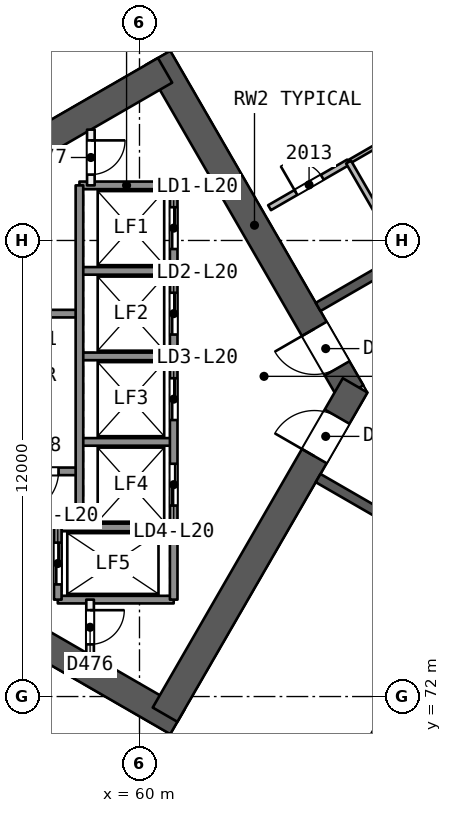
"""IFC4 building model, lengths in metres.
Left out: names, types, materials, properties, quantities, classifications, styles, units other than length and angle.
Written with IfcOpenShell. Run it as: python <this file> out.ifc"""

import sys

from ifc_helpers import new_model, si_unit, direction, frame, frame_2d, origin, place, context, subcontext, project, spatial, rectangle, extrude, element, fill, save


model = new_model("IFC4")
c1 = context("Model", 3, precision=1e-05, world=origin(), true_north=direction((0.0, 1.0)))
c2 = subcontext(c1, "Body", "Model", "MODEL_VIEW")
j1 = project(units=[si_unit("LENGTHUNIT", "METRE"), si_unit("PLANEANGLEUNIT", "RADIAN")], contexts=[c1])
p1 = place(None, origin())
s1 = spatial("IfcSite", under=j1, at=p1, CompositionType="ELEMENT")
p2 = place(p1, origin())
s2 = spatial("IfcBuilding", under=s1, at=p2, CompositionType="ELEMENT")
p3 = place(p2, frame((0.0, 0.0, 86.9)))
s3 = spatial("IfcBuildingStorey", under=s2, at=p3, CompositionType="ELEMENT", Elevation=86.9)
p4 = place(p3, frame((65.567, 80.0, 0.0), z_axis=(0.0, 0.0, 1.0), x_axis=(-0.499988615364, 0.866031976607, 0.0)))
e1 = element("IfcWall", 1, at=p4, inside=s3, PredefinedType="SHEAR", context=c2, shape_type="SweptSolid", body=[
    extrude(rectangle(XDim=10.163, YDim=0.75, at=frame_2d((5.082, 0.0))), origin(), (0.0, 0.0, 1.0), 3.7),
])
p5 = place(p4, frame((0.733, 0.0, 0.0)))
e2 = element("IfcOpeningElement", 2, at=p5, cuts=e1, PredefinedType="OPENING", context=c2, shape_type="SweptSolid", body=[
    extrude(rectangle(XDim=1.2, YDim=2.1, at=frame_2d((0.6, 1.05))), frame((0.0, 0.385, 0.0), z_axis=(0.0, -1.0, 0.0), x_axis=(1.0, 0.0, 0.0)), (0.0, 0.0, 1.0), 0.771),
])
p6 = place(p3, frame((60.673, 88.477, 0.0), z_axis=(0.0, 0.0, 1.0), x_axis=(-0.8660248072, -0.500001033313, 0.0)))
e3 = element("IfcWall", 3, at=p6, inside=s3, PredefinedType="SHEAR", context=c2, shape_type="SweptSolid", body=[
    extrude(rectangle(XDim=13.958, YDim=0.75, at=frame_2d((6.979, 0.0))), origin(), (0.0, 0.0, 1.0), 3.7),
])
p7 = place(p3, frame((48.772, 78.394, 0.0), z_axis=(0.0, 0.0, 1.0), x_axis=(0.866028339916, -0.499994914436, 0.0)))
e4 = element("IfcWall", 4, at=p7, inside=s3, PredefinedType="SHEAR", context=c2, shape_type="SweptSolid", body=[
    extrude(rectangle(XDim=14.117, YDim=0.75, at=frame_2d((7.059, 0.0))), origin(), (0.0, 0.0, 1.0), 3.7),
])
p8 = place(p3, frame((60.673, 71.523, 0.0), z_axis=(0.0, 0.0, 1.0), x_axis=(0.499997052475, 0.866027105532, 0.0)))
e5 = element("IfcWall", 5, at=p8, inside=s3, PredefinedType="SHEAR", context=c2, shape_type="SweptSolid", body=[
    extrude(rectangle(XDim=10.005, YDim=0.75, at=frame_2d((5.002, 0.0))), origin(), (0.0, 0.0, 1.0), 3.7),
])
p9 = place(p8, frame((7.855, 0.0, 0.0)))
e6 = element("IfcOpeningElement", 6, at=p9, cuts=e5, PredefinedType="OPENING", context=c2, shape_type="SweptSolid", body=[
    extrude(rectangle(XDim=1.2, YDim=2.1, at=frame_2d((0.6, 1.05))), frame((0.0, 0.385, 0.0), z_axis=(0.0, -1.0, 0.0), x_axis=(1.0, 0.0, 0.0)), (0.0, 0.0, 1.0), 0.771),
])
p10 = place(p3, frame((78.2, 90.046, 0.0), z_axis=(0.0, 0.0, 1.0), x_axis=(-0.866026492143, -0.499998114903, 0.0)))
e7 = element("IfcWall", 7, at=p10, inside=s3, PredefinedType="SHEAR", context=c2, shape_type="SweptSolid", body=[
    extrude(rectangle(XDim=15.588, YDim=0.25, at=frame_2d((7.794, 0.0))), origin(), (0.0, 0.0, 1.0), 3.2),
])
p11 = place(p10, frame((4.718, 0.0, 0.0)))
e8 = element("IfcOpeningElement", 8, at=p11, cuts=e7, PredefinedType="OPENING", context=c2, shape_type="SweptSolid", body=[
    extrude(rectangle(XDim=1.0, YDim=2.1, at=frame_2d((0.5, 1.05))), frame((0.0, 0.135, 0.0), z_axis=(0.0, -1.0, 0.0), x_axis=(1.0, 0.0, 0.0)), (0.0, 0.0, 1.0), 0.271),
])
p12 = place(p10, frame((7.194, 0.0, 0.0)))
e9 = element("IfcOpeningElement", 9, at=p12, cuts=e7, PredefinedType="OPENING", context=c2, shape_type="SweptSolid", body=[
    extrude(rectangle(XDim=1.2, YDim=2.4, at=frame_2d((0.6, 1.2))), frame((0.0, 0.135, 0.0), z_axis=(0.0, -1.0, 0.0), x_axis=(1.0, 0.0, 0.0)), (0.0, 0.0, 1.0), 0.271),
])
p13 = place(p10, frame((9.871, 0.0, 0.0)))
e10 = element("IfcOpeningElement", 10, at=p13, cuts=e7, PredefinedType="OPENING", context=c2, shape_type="SweptSolid", body=[
    extrude(rectangle(XDim=1.0, YDim=2.1, at=frame_2d((0.5, 1.05))), frame((0.0, 0.135, 0.0), z_axis=(0.0, -1.0, 0.0), x_axis=(1.0, 0.0, 0.0)), (0.0, 0.0, 1.0), 0.271),
])
p14 = place(p3, frame((64.7, 77.748, 0.0), z_axis=(0.0, 0.0, 1.0), x_axis=(0.866026492143, -0.499998114903, 0.0)))
e11 = element("IfcWall", 11, at=p14, inside=s3, PredefinedType="SHEAR", context=c2, shape_type="SweptSolid", body=[
    extrude(rectangle(XDim=15.588, YDim=0.25, at=frame_2d((7.794, 0.0))), origin(), (0.0, 0.0, 1.0), 3.2),
])
p15 = place(p14, frame((1.738, 0.0, 0.0)))
e12 = element("IfcOpeningElement", 12, at=p15, cuts=e11, PredefinedType="OPENING", context=c2, shape_type="SweptSolid", body=[
    extrude(rectangle(XDim=1.2, YDim=2.4, at=frame_2d((0.6, 1.2))), frame((0.0, 0.135, 0.0), z_axis=(0.0, -1.0, 0.0), x_axis=(1.0, 0.0, 0.0)), (0.0, 0.0, 1.0), 0.271),
])
p16 = place(p14, frame((5.785, 0.0, 0.0)))
e13 = element("IfcOpeningElement", 13, at=p16, cuts=e11, PredefinedType="OPENING", context=c2, shape_type="SweptSolid", body=[
    extrude(rectangle(XDim=0.9, YDim=2.1, at=frame_2d((0.45, 1.05))), frame((0.0, 0.135, 0.0), z_axis=(0.0, -1.0, 0.0), x_axis=(1.0, 0.0, 0.0)), (0.0, 0.0, 1.0), 0.271),
])
p17 = place(p14, frame((8.903, 0.0, 0.0)))
e14 = element("IfcOpeningElement", 14, at=p17, cuts=e11, PredefinedType="OPENING", context=c2, shape_type="SweptSolid", body=[
    extrude(rectangle(XDim=0.9, YDim=2.1, at=frame_2d((0.45, 1.05))), frame((0.0, 0.135, 0.0), z_axis=(0.0, -1.0, 0.0), x_axis=(1.0, 0.0, 0.0)), (0.0, 0.0, 1.0), 0.271),
])
p18 = place(p14, frame((12.75, 0.0, 0.0)))
e15 = element("IfcOpeningElement", 15, at=p18, cuts=e11, PredefinedType="OPENING", context=c2, shape_type="SweptSolid", body=[
    extrude(rectangle(XDim=1.0, YDim=2.1, at=frame_2d((0.5, 1.05))), frame((0.0, 0.135, 0.0), z_axis=(0.0, -1.0, 0.0), x_axis=(1.0, 0.0, 0.0)), (0.0, 0.0, 1.0), 0.271),
])
p19 = place(p3, frame((63.549, 96.716, 0.0), z_axis=(0.0, 0.0, 1.0), x_axis=(0.50000686924, -0.866021437791, 0.0)))
e16 = element("IfcWall", 16, at=p19, inside=s3, PredefinedType="PARTITIONING", context=c2, shape_type="SweptSolid", body=[
    extrude(rectangle(XDim=13.102, YDim=0.2, at=frame_2d((6.551, 0.0))), origin(), (0.0, 0.0, 1.0), 3.2),
])
p20 = place(p3, frame((63.422, 84.863, 0.0), z_axis=(0.0, 0.0, 1.0), x_axis=(0.865994240961, 0.500053971709, 0.0)))
e17 = element("IfcWall", 17, at=p20, inside=s3, PredefinedType="PARTITIONING", context=c2, shape_type="SweptSolid", body=[
    extrude(rectangle(XDim=2.401, YDim=0.15, at=frame_2d((1.201, 0.0))), origin(), (0.0, 0.0, 1.0), 3.2),
])
p21 = place(p20, frame((0.801, 0.0, 0.0)))
e18 = element("IfcOpeningElement", 18, at=p21, cuts=e17, PredefinedType="OPENING", context=c2, shape_type="SweptSolid", body=[
    extrude(rectangle(XDim=0.8, YDim=2.1, at=frame_2d((0.4, 1.05))), frame((0.0, 0.085, 0.0), z_axis=(0.0, -1.0, 0.0), x_axis=(1.0, 0.0, 0.0)), (0.0, 0.0, 1.0), 0.171),
])
p22 = place(p3, frame((65.502, 86.063, 0.0), z_axis=(0.0, 0.0, 1.0), x_axis=(0.866055983265, 0.499947031044, 0.0)))
e19 = element("IfcWall", 19, at=p22, inside=s3, PredefinedType="PARTITIONING", context=c2, shape_type="SweptSolid", body=[
    extrude(rectangle(XDim=1.6, YDim=0.1, at=frame_2d((0.8, 0.0))), origin(), (0.0, 0.0, 1.0), 3.2),
])
p23 = place(p3, frame((66.952, 83.552, 0.0), z_axis=(0.0, 0.0, 1.0), x_axis=(-0.499987231761, 0.866032775405, 0.0)))
e20 = element("IfcWall", 20, at=p23, inside=s3, PredefinedType="PARTITIONING", context=c2, shape_type="SweptSolid", body=[
    extrude(rectangle(XDim=2.9, YDim=0.15, at=frame_2d((1.45, 0.0))), origin(), (0.0, 0.0, 1.0), 3.2),
])
for number, where, z_axis, x_axis in (
    (21, (62.199, 64.063, 0.0), (0.0, 0.0, 1.0), (0.5, 0.866, 0.0)),
    (22, (64.899, 62.504, 0.0), (0.0, 0.0, 1.0), (0.5, 0.866, 0.0)),
):
    element("IfcWall", number, at=place(p3, frame(where, z_axis=z_axis, x_axis=x_axis)), inside=s3, PredefinedType="PARTITIONING", context=c2, shape_type="SweptSolid", body=[
        extrude(rectangle(XDim=13.102, YDim=0.2, at=frame_2d((6.551, 0.0))), origin(), (0.0, 0.0, 1.0), 3.2),
    ])
p24 = place(p3, frame((39.484, 82.994, 0.0), z_axis=(0.0, 0.0, 1.0), x_axis=(0.866025940441, 0.499999070483, 0.0)))
e23 = element("IfcWall", 23, at=p24, inside=s3, PredefinedType="SOLIDWALL", context=c2, shape_type="SweptSolid", body=[
    extrude(rectangle(XDim=58.522, YDim=0.3, at=frame_2d((29.261, 0.0))), origin(), (0.0, 0.0, 1.0), 3.2),
])
p25 = place(p24, frame((43.514, 0.0, 0.0)))
e24 = element("IfcOpeningElement", 24, at=p25, cuts=e23, PredefinedType="OPENING", context=c2, shape_type="SweptSolid", body=[
    extrude(rectangle(XDim=2.4, YDim=2.4, at=frame_2d((1.2, 1.2))), frame((0.0, 0.161, 0.0), z_axis=(0.0, -1.0, 0.0), x_axis=(1.0, 0.0, 0.0)), (0.0, 0.0, 1.0), 0.321),
])
p26 = place(p24, frame((12.608, 0.0, 0.0)))
e25 = element("IfcOpeningElement", 25, at=p26, cuts=e23, PredefinedType="OPENING", context=c2, shape_type="SweptSolid", body=[
    extrude(rectangle(XDim=2.4, YDim=2.4, at=frame_2d((1.2, 1.2))), frame((0.0, 0.161, 0.0), z_axis=(0.0, -1.0, 0.0), x_axis=(1.0, 0.0, 0.0)), (0.0, 0.0, 1.0), 0.321),
])
p27 = place(p24, frame((28.061, 0.0, 0.0)))
e26 = element("IfcOpeningElement", 26, at=p27, cuts=e23, PredefinedType="OPENING", context=c2, shape_type="SweptSolid", body=[
    extrude(rectangle(XDim=2.4, YDim=2.4, at=frame_2d((1.2, 1.2))), frame((0.0, 0.161, 0.0), z_axis=(0.0, -1.0, 0.0), x_axis=(1.0, 0.0, 0.0)), (0.0, 0.0, 1.0), 0.321),
])
p28 = place(p3, frame((90.165, 47.745, 0.0), z_axis=(0.0, 0.0, 1.0), x_axis=(-0.866025940441, 0.499999070483, 0.0)))
e27 = element("IfcWall", 27, at=p28, inside=s3, PredefinedType="SOLIDWALL", context=c2, shape_type="SweptSolid", body=[
    extrude(rectangle(XDim=58.522, YDim=0.3, at=frame_2d((29.261, 0.0))), origin(), (0.0, 0.0, 1.0), 3.2),
])
p29 = place(p28, frame((44.294, 0.0, 0.0)))
e28 = element("IfcOpeningElement", 28, at=p29, cuts=e27, PredefinedType="OPENING", context=c2, shape_type="SweptSolid", body=[
    extrude(rectangle(XDim=2.4, YDim=2.4, at=frame_2d((1.2, 1.2))), frame((0.0, 0.161, 0.0), z_axis=(0.0, -1.0, 0.0), x_axis=(1.0, 0.0, 0.0)), (0.0, 0.0, 1.0), 0.321),
])
p30 = place(p28, frame((22.605, 0.0, 0.0)))
e29 = element("IfcOpeningElement", 29, at=p30, cuts=e27, PredefinedType="OPENING", context=c2, shape_type="SweptSolid", body=[
    extrude(rectangle(XDim=2.4, YDim=2.4, at=frame_2d((1.2, 1.2))), frame((0.0, 0.161, 0.0), z_axis=(0.0, -1.0, 0.0), x_axis=(1.0, 0.0, 0.0)), (0.0, 0.0, 1.0), 0.321),
])
p31 = place(p28, frame((10.658, 0.0, 0.0)))
e30 = element("IfcOpeningElement", 30, at=p31, cuts=e27, PredefinedType="OPENING", context=c2, shape_type="SweptSolid", body=[
    extrude(rectangle(XDim=2.4, YDim=2.4, at=frame_2d((1.2, 1.2))), frame((0.0, 0.161, 0.0), z_axis=(0.0, -1.0, 0.0), x_axis=(1.0, 0.0, 0.0)), (0.0, 0.0, 1.0), 0.321),
])
p32 = place(p28, frame((29.92, 0.0, 0.9)))
e31 = element("IfcOpeningElement", 31, at=p32, cuts=e27, PredefinedType="OPENING", context=c2, shape_type="SweptSolid", body=[
    extrude(rectangle(XDim=1.8, YDim=1.5, at=frame_2d((0.9, 0.75))), frame((0.0, 0.161, 0.0), z_axis=(0.0, -1.0, 0.0), x_axis=(1.0, 0.0, 0.0)), (0.0, 0.0, 1.0), 0.321),
])
p33 = place(p28, frame((26.802, 0.0, 0.9)))
e32 = element("IfcOpeningElement", 32, at=p33, cuts=e27, PredefinedType="OPENING", context=c2, shape_type="SweptSolid", body=[
    extrude(rectangle(XDim=1.8, YDim=1.5, at=frame_2d((0.9, 0.75))), frame((0.0, 0.161, 0.0), z_axis=(0.0, -1.0, 0.0), x_axis=(1.0, 0.0, 0.0)), (0.0, 0.0, 1.0), 0.321),
])
for number, where, z_axis, x_axis in (
    (33, (60.9, 85.45, 0.0), (0.0, 0.0, 1.0), (-1.0, 0.0, 0.0)),
    (34, (60.9, 83.2, 0.0), (0.0, 0.0, 1.0), (-1.0, 0.0, 0.0)),
):
    element("IfcWall", number, at=place(p3, frame(where, z_axis=z_axis, x_axis=x_axis)), inside=s3, PredefinedType="SOLIDWALL", context=c2, shape_type="SweptSolid", body=[
        extrude(rectangle(XDim=2.48, YDim=0.2, at=frame_2d((1.24, 0.0))), origin(), (0.0, 0.0, 1.0), 3.2),
    ])
p34 = place(p3, frame((58.42, 82.075, 0.0), z_axis=(0.0, 0.0, 1.0), x_axis=(-1.0, 0.0, 0.0)))
e35 = element("IfcWall", 35, at=p34, inside=s3, PredefinedType="SOLIDWALL", context=c2, shape_type="SweptSolid", body=[
    extrude(rectangle(XDim=7.7, YDim=0.2, at=frame_2d((3.85, 0.0))), origin(), (0.0, 0.0, 1.0), 3.2),
])
for number, where, z_axis, x_axis in (
    (36, (60.9, 80.95, 0.0), (0.0, 0.0, 1.0), (-1.0, 0.0, 0.0)),
    (37, (60.9, 78.7, 0.0), (0.0, 0.0, 1.0), (-1.0, 0.0, 0.0)),
):
    element("IfcWall", number, at=place(p3, frame(where, z_axis=z_axis, x_axis=x_axis)), inside=s3, PredefinedType="SOLIDWALL", context=c2, shape_type="SweptSolid", body=[
        extrude(rectangle(XDim=2.48, YDim=0.2, at=frame_2d((1.24, 0.0))), origin(), (0.0, 0.0, 1.0), 3.2),
    ])
p35 = place(p3, frame((58.42, 77.925, 0.0), z_axis=(0.0, 0.0, 1.0), x_axis=(-1.0, 0.0, 0.0)))
e38 = element("IfcWall", 38, at=p35, inside=s3, PredefinedType="SOLIDWALL", context=c2, shape_type="SweptSolid", body=[
    extrude(rectangle(XDim=7.7, YDim=0.2, at=frame_2d((3.85, 0.0))), origin(), (0.0, 0.0, 1.0), 3.2),
])
p36 = place(p35, frame((0.55, 0.0, 0.0)))
e39 = element("IfcOpeningElement", 39, at=p36, cuts=e38, PredefinedType="OPENING", context=c2, shape_type="SweptSolid", body=[
    extrude(rectangle(XDim=1.1, YDim=2.1, at=frame_2d((0.55, 1.05))), frame((0.0, 0.11, 0.0), z_axis=(0.0, -1.0, 0.0), x_axis=(1.0, 0.0, 0.0)), (0.0, 0.0, 1.0), 0.221),
])
for number, where, z_axis, x_axis in (
    (40, (60.9, 76.45, 0.0), (0.0, 0.0, 1.0), (-1.0, 0.0, 0.0)),
    (41, (60.9, 74.55, 0.0), (0.0, 0.0, 1.0), (-1.0, 0.0, 0.0)),
):
    element("IfcWall", number, at=place(p3, frame(where, z_axis=z_axis, x_axis=x_axis)), inside=s3, PredefinedType="SOLIDWALL", context=c2, shape_type="SweptSolid", body=[
        extrude(rectangle(XDim=3.05, YDim=0.2, at=frame_2d((1.525, 0.0))), origin(), (0.0, 0.0, 1.0), 3.2),
    ])
p37 = place(p3, frame((60.9, 85.45, 0.0), z_axis=(0.0, 0.0, 1.0), x_axis=(0.0, -1.0, 0.0)))
e42 = element("IfcWall", 42, at=p37, inside=s3, PredefinedType="SOLIDWALL", context=c2, shape_type="SweptSolid", body=[
    extrude(rectangle(XDim=10.9, YDim=0.2, at=frame_2d((5.45, 0.0))), origin(), (0.0, 0.0, 1.0), 3.2),
])
p38 = place(p37, frame((0.575, 0.0, 0.0)))
e43 = element("IfcOpeningElement", 43, at=p38, cuts=e42, PredefinedType="OPENING", context=c2, shape_type="SweptSolid", body=[
    extrude(rectangle(XDim=1.1, YDim=2.1, at=frame_2d((0.55, 1.05))), frame((0.0, 0.11, 0.0), z_axis=(0.0, -1.0, 0.0), x_axis=(1.0, 0.0, 0.0)), (0.0, 0.0, 1.0), 0.221),
])
p39 = place(p37, frame((2.825, 0.0, 0.0)))
e44 = element("IfcOpeningElement", 44, at=p39, cuts=e42, PredefinedType="OPENING", context=c2, shape_type="SweptSolid", body=[
    extrude(rectangle(XDim=1.1, YDim=2.1, at=frame_2d((0.55, 1.05))), frame((0.0, 0.11, 0.0), z_axis=(0.0, -1.0, 0.0), x_axis=(1.0, 0.0, 0.0)), (0.0, 0.0, 1.0), 0.221),
])
p40 = place(p37, frame((5.075, 0.0, 0.0)))
e45 = element("IfcOpeningElement", 45, at=p40, cuts=e42, PredefinedType="OPENING", context=c2, shape_type="SweptSolid", body=[
    extrude(rectangle(XDim=1.1, YDim=2.1, at=frame_2d((0.55, 1.05))), frame((0.0, 0.11, 0.0), z_axis=(0.0, -1.0, 0.0), x_axis=(1.0, 0.0, 0.0)), (0.0, 0.0, 1.0), 0.221),
])
p41 = place(p37, frame((7.325, 0.0, 0.0)))
e46 = element("IfcOpeningElement", 46, at=p41, cuts=e42, PredefinedType="OPENING", context=c2, shape_type="SweptSolid", body=[
    extrude(rectangle(XDim=1.1, YDim=2.1, at=frame_2d((0.55, 1.05))), frame((0.0, 0.11, 0.0), z_axis=(0.0, -1.0, 0.0), x_axis=(1.0, 0.0, 0.0)), (0.0, 0.0, 1.0), 0.221),
])
p42 = place(p3, frame((58.72, 86.917, 0.0), z_axis=(0.0, 0.0, 1.0), x_axis=(0.0, -1.0, 0.0)))
e47 = element("IfcWall", 47, at=p42, inside=s3, PredefinedType="PARTITIONING", context=c2, shape_type="SweptSolid", body=[
    extrude(rectangle(XDim=1.467, YDim=0.2, at=frame_2d((0.733, 0.0))), origin(), (0.0, 0.0, 1.0), 3.2),
])
p43 = place(p42, frame((0.283, 0.0, 0.0)))
e48 = element("IfcOpeningElement", 48, at=p43, cuts=e47, PredefinedType="OPENING", context=c2, shape_type="SweptSolid", body=[
    extrude(rectangle(XDim=0.9, YDim=2.1, at=frame_2d((0.45, 1.05))), frame((0.0, 0.11, 0.0), z_axis=(0.0, -1.0, 0.0), x_axis=(1.0, 0.0, 0.0)), (0.0, 0.0, 1.0), 0.221),
])
p44 = place(p3, frame((58.7, 74.55, 0.0), z_axis=(0.0, 0.0, 1.0), x_axis=(0.0, -1.0, 0.0)))
e49 = element("IfcWall", 49, at=p44, inside=s3, PredefinedType="PARTITIONING", context=c2, shape_type="SweptSolid", body=[
    extrude(rectangle(XDim=1.455, YDim=0.2, at=frame_2d((0.728, 0.0))), origin(), (0.0, 0.0, 1.0), 3.2),
])
p45 = place(p44, frame((0.278, 0.0, 0.0)))
e50 = element("IfcOpeningElement", 50, at=p45, cuts=e49, PredefinedType="OPENING", context=c2, shape_type="SweptSolid", body=[
    extrude(rectangle(XDim=0.9, YDim=2.1, at=frame_2d((0.45, 1.05))), frame((0.0, 0.11, 0.0), z_axis=(0.0, -1.0, 0.0), x_axis=(1.0, 0.0, 0.0)), (0.0, 0.0, 1.0), 0.221),
])
p46 = place(p3, frame((58.42, 85.45, 0.0), z_axis=(0.0, 0.0, 1.0), x_axis=(0.0, -1.0, 0.0)))
e51 = element("IfcWall", 51, at=p46, inside=s3, PredefinedType="SOLIDWALL", context=c2, shape_type="SweptSolid", body=[
    extrude(rectangle(XDim=9.0, YDim=0.2, at=frame_2d((4.5, 0.0))), origin(), (0.0, 0.0, 1.0), 3.2),
])
p47 = place(p3, frame((57.85, 76.45, 0.0), z_axis=(0.0, 0.0, 1.0), x_axis=(0.0, -1.0, 0.0)))
e52 = element("IfcWall", 52, at=p47, inside=s3, PredefinedType="SOLIDWALL", context=c2, shape_type="SweptSolid", body=[
    extrude(rectangle(XDim=1.9, YDim=0.2, at=frame_2d((0.95, 0.0))), origin(), (0.0, 0.0, 1.0), 3.2),
])
p48 = place(p47, frame((0.4, 0.0, 0.0)))
e53 = element("IfcOpeningElement", 53, at=p48, cuts=e52, PredefinedType="OPENING", context=c2, shape_type="SweptSolid", body=[
    extrude(rectangle(XDim=1.1, YDim=2.1, at=frame_2d((0.55, 1.05))), frame((0.0, 0.11, 0.0), z_axis=(0.0, -1.0, 0.0), x_axis=(1.0, 0.0, 0.0)), (0.0, 0.0, 1.0), 0.221),
])
p49 = place(p21, origin())
e54 = element("IfcDoor", 54, at=p49, inside=s3, OperationType="SINGLE_SWING_LEFT", PredefinedType="NOTDEFINED", context=c2, shape_type="SweptSolid", body=[
    extrude(rectangle(XDim=0.8, YDim=2.1, at=frame_2d((0.4, 1.05))), frame((0.0, 0.025, 0.0), z_axis=(0.0, -1.0, 0.0), x_axis=(1.0, 0.0, 0.0)), (0.0, 0.0, 1.0), 0.05),
])
fill(e18, e54)
p50 = place(p5, origin())
e55 = element("IfcDoor", 55, at=p50, inside=s3, OperationType="SINGLE_SWING_RIGHT", PredefinedType="NOTDEFINED", context=c2, shape_type="SweptSolid", body=[
    extrude(rectangle(XDim=1.2, YDim=2.1, at=frame_2d((0.6, 1.05))), frame((0.0, 0.025, 0.0), z_axis=(0.0, -1.0, 0.0), x_axis=(1.0, 0.0, 0.0)), (0.0, 0.0, 1.0), 0.05),
])
fill(e2, e55)
p51 = place(p9, origin())
e56 = element("IfcDoor", 56, at=p51, inside=s3, OperationType="SINGLE_SWING_LEFT", PredefinedType="NOTDEFINED", context=c2, shape_type="SweptSolid", body=[
    extrude(rectangle(XDim=1.2, YDim=2.1, at=frame_2d((0.6, 1.05))), frame((0.0, 0.025, 0.0), z_axis=(0.0, -1.0, 0.0), x_axis=(1.0, 0.0, 0.0)), (0.0, 0.0, 1.0), 0.05),
])
fill(e6, e56)
p52 = place(p38, origin())
e57 = element("IfcDoor", 57, at=p52, inside=s3, OperationType="SLIDING_TO_RIGHT", PredefinedType="NOTDEFINED", context=c2, shape_type="SweptSolid", body=[
    extrude(rectangle(XDim=1.1, YDim=2.1, at=frame_2d((0.55, 1.05))), frame((0.0, 0.025, 0.0), z_axis=(0.0, -1.0, 0.0), x_axis=(1.0, 0.0, 0.0)), (0.0, 0.0, 1.0), 0.05),
])
fill(e43, e57)
p53 = place(p39, origin())
e58 = element("IfcDoor", 58, at=p53, inside=s3, OperationType="SLIDING_TO_LEFT", PredefinedType="NOTDEFINED", context=c2, shape_type="SweptSolid", body=[
    extrude(rectangle(XDim=1.1, YDim=2.1, at=frame_2d((0.55, 1.05))), frame((0.0, 0.025, 0.0), z_axis=(0.0, -1.0, 0.0), x_axis=(1.0, 0.0, 0.0)), (0.0, 0.0, 1.0), 0.05),
])
fill(e44, e58)
p54 = place(p40, origin())
e59 = element("IfcDoor", 59, at=p54, inside=s3, OperationType="SLIDING_TO_RIGHT", PredefinedType="NOTDEFINED", context=c2, shape_type="SweptSolid", body=[
    extrude(rectangle(XDim=1.1, YDim=2.1, at=frame_2d((0.55, 1.05))), frame((0.0, 0.025, 0.0), z_axis=(0.0, -1.0, 0.0), x_axis=(1.0, 0.0, 0.0)), (0.0, 0.0, 1.0), 0.05),
])
fill(e45, e59)
p55 = place(p41, origin())
e60 = element("IfcDoor", 60, at=p55, inside=s3, OperationType="SLIDING_TO_LEFT", PredefinedType="NOTDEFINED", context=c2, shape_type="SweptSolid", body=[
    extrude(rectangle(XDim=1.1, YDim=2.1, at=frame_2d((0.55, 1.05))), frame((0.0, 0.025, 0.0), z_axis=(0.0, -1.0, 0.0), x_axis=(1.0, 0.0, 0.0)), (0.0, 0.0, 1.0), 0.05),
])
fill(e46, e60)
p56 = place(p48, origin())
e61 = element("IfcDoor", 61, at=p56, inside=s3, OperationType="SLIDING_TO_RIGHT", PredefinedType="NOTDEFINED", context=c2, shape_type="SweptSolid", body=[
    extrude(rectangle(XDim=1.1, YDim=2.1, at=frame_2d((0.55, 1.05))), frame((0.0, 0.025, 0.0), z_axis=(0.0, -1.0, 0.0), x_axis=(1.0, 0.0, 0.0)), (0.0, 0.0, 1.0), 0.05),
])
fill(e53, e61)
p57 = place(p45, origin())
e62 = element("IfcDoor", 62, at=p57, inside=s3, OperationType="SINGLE_SWING_LEFT", PredefinedType="NOTDEFINED", context=c2, shape_type="SweptSolid", body=[
    extrude(rectangle(XDim=0.9, YDim=2.1, at=frame_2d((0.45, 1.05))), frame((0.0, 0.025, 0.0), z_axis=(0.0, -1.0, 0.0), x_axis=(1.0, 0.0, 0.0)), (0.0, 0.0, 1.0), 0.05),
])
fill(e50, e62)
p58 = place(p43, origin())
e63 = element("IfcDoor", 63, at=p58, inside=s3, OperationType="SINGLE_SWING_LEFT", PredefinedType="NOTDEFINED", context=c2, shape_type="SweptSolid", body=[
    extrude(rectangle(XDim=0.9, YDim=2.1, at=frame_2d((0.45, 1.05))), frame((0.0, 0.025, 0.0), z_axis=(0.0, -1.0, 0.0), x_axis=(1.0, 0.0, 0.0)), (0.0, 0.0, 1.0), 0.05),
])
fill(e48, e63)
p59 = place(p36, origin())
e64 = element("IfcDoor", 64, at=p59, inside=s3, OperationType="SINGLE_SWING_RIGHT", PredefinedType="NOTDEFINED", context=c2, shape_type="SweptSolid", body=[
    extrude(rectangle(XDim=1.1, YDim=2.1, at=frame_2d((0.55, 1.05))), frame((0.0, 0.025, 0.0), z_axis=(0.0, -1.0, 0.0), x_axis=(1.0, 0.0, 0.0)), (0.0, 0.0, 1.0), 0.05),
])
fill(e39, e64)
save(model, sys.argv[1])
